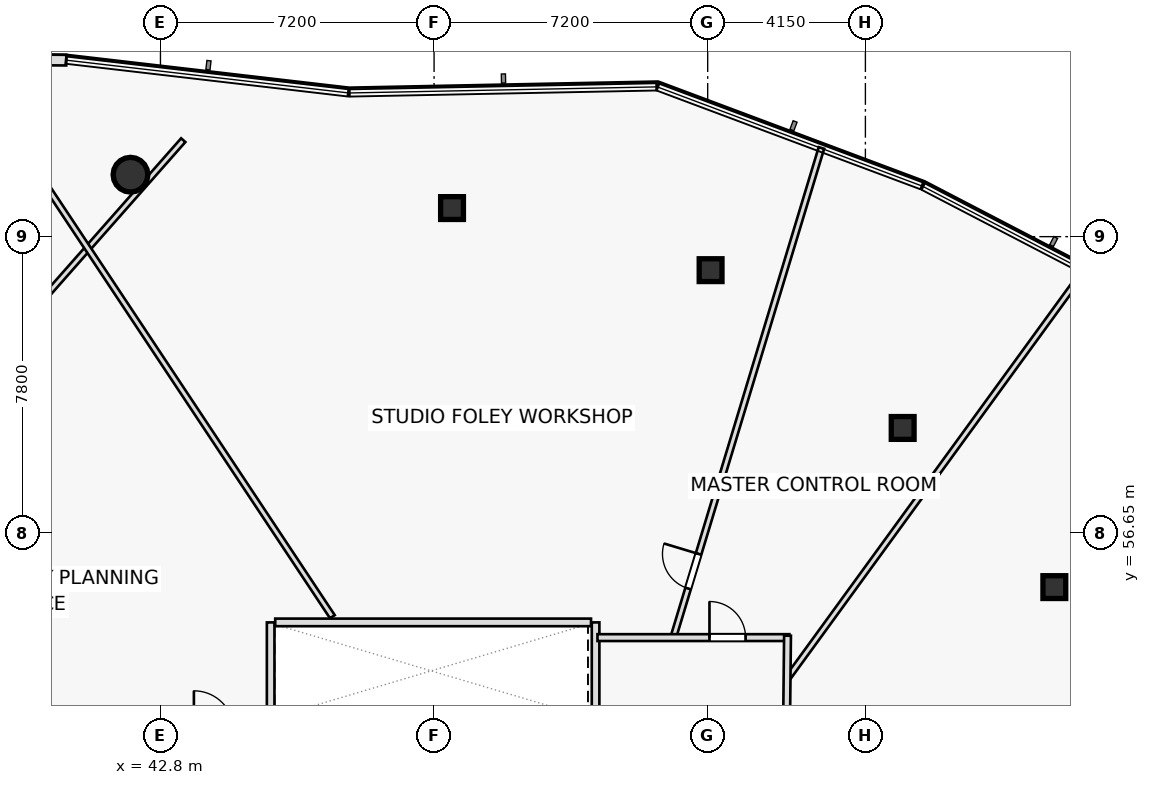
"""IFC4 building model, lengths in metres.
Left out: names, types, materials, properties, quantities, classifications, styles, units other than length and angle.
Written with IfcOpenShell. Run it as: python <this file> out.ifc"""

import sys

from ifc_helpers import new_model, si_unit, direction, frame, frame_2d, origin, origin_2d, place, context, subcontext, project, spatial, rectangle, hollow_rectangle, hollow_circle, extrude, element, fill, save


model = new_model("IFC4")
c1 = context("Model", 3, precision=1e-05, world=origin(), true_north=direction((0.0, 1.0)))
c2 = subcontext(c1, "Body", "Model", "MODEL_VIEW")
j1 = project(units=[si_unit("LENGTHUNIT", "METRE"), si_unit("PLANEANGLEUNIT", "RADIAN")], contexts=[c1])
p1 = place(None, origin())
s1 = spatial("IfcSite", under=j1, at=p1, CompositionType="ELEMENT")
p2 = place(p1, origin())
s2 = spatial("IfcBuilding", under=s1, at=p2, CompositionType="ELEMENT")
p3 = place(p2, frame((0.0, 0.0, 184.9)))
s3 = spatial("IfcBuildingStorey", under=s2, at=p3, CompositionType="ELEMENT", Elevation=184.9)
p4 = place(p3, frame((42.011, 66.08, 0.0), z_axis=(0.0, 0.0, 1.0), x_axis=(1.0, 0.0, 0.0)))
e1 = element("IfcColumn", 1, at=p4, inside=s3, PredefinedType="COLUMN", context=c2, shape_type="SweptSolid", body=[
    extrude(hollow_circle(Radius=0.457, WallThickness=0.04, at=origin_2d()), origin(), (0.0, 0.0, 1.0), 3.55),
])
for number, where, z_axis, x_axis in (
    (2, (66.322, 55.229, 0.0), (0.0, 0.0, 1.0), (1.0, 0.0, 0.0)),
    (3, (62.331, 59.416, 0.0), (0.0, 0.0, 1.0), (1.0, 0.0, 0.0)),
    (4, (57.277, 63.568, 0.0), (0.0, 0.0, 1.0), (1.0, 0.0, 0.0)),
    (5, (50.472, 65.202, 0.0), (0.0, 0.0, 1.0), (1.0, 0.0, 0.0)),
):
    element("IfcColumn", number, at=place(p3, frame(where, z_axis=z_axis, x_axis=x_axis)), inside=s3, PredefinedType="COLUMN", context=c2, shape_type="SweptSolid", body=[
        extrude(hollow_rectangle(XDim=0.6, YDim=0.6, WallThickness=0.036, at=origin_2d()), origin(), (0.0, 0.0, 1.0), 3.55),
    ])
for number, where, z_axis, x_axis in (
    (6, (45.7, 51.7, 0.0), (0.0, 0.0, 1.0), (0.0, 1.0, 0.0)),
    (7, (54.25, 51.7, 0.0), (0.0, 0.0, 1.0), (0.0, 1.0, 0.0)),
):
    element("IfcWall", number, at=place(p3, frame(where, z_axis=z_axis, x_axis=x_axis)), inside=s3, PredefinedType="PARTITIONING", context=c2, shape_type="SweptSolid", body=[
        extrude(rectangle(XDim=2.6, YDim=0.2, at=frame_2d((1.3, 0.0))), origin(), (0.0, 0.0, 1.0), 3.55),
    ])
p5 = place(p3, frame((43.4, 66.989, 0.0), z_axis=(0.0, 0.0, 1.0), x_axis=(-0.661622343701, -0.749837231881, 0.0)))
e8 = element("IfcWall", 8, at=p5, inside=s3, PredefinedType="PARTITIONING", context=c2, shape_type="SweptSolid", body=[
    extrude(rectangle(XDim=11.427, YDim=0.15, at=frame_2d((5.714, 0.0))), origin(), (0.0, 0.0, 1.0), 2.935),
])
p6 = place(p3, frame((59.289, 52.814, 0.0), z_axis=(0.0, 0.0, 1.0), x_axis=(0.588526256587, 0.808478104408, 0.0)))
e9 = element("IfcWall", 9, at=p6, inside=s3, PredefinedType="PARTITIONING", context=c2, shape_type="SweptSolid", body=[
    extrude(rectangle(XDim=13.304, YDim=0.15, at=frame_2d((6.652, 0.0))), origin(), (0.0, 0.0, 1.0), 3.025),
])
p7 = place(p3, frame((56.294, 53.9, 0.0), z_axis=(0.0, 0.0, 1.0), x_axis=(0.289678173214, 0.957124106876, 0.0)))
e10 = element("IfcWall", 10, at=p7, inside=s3, PredefinedType="PARTITIONING", context=c2, shape_type="SweptSolid", body=[
    extrude(rectangle(XDim=13.461, YDim=0.15, at=frame_2d((6.73, 0.0))), origin(), (0.0, 0.0, 1.0), 2.935),
])
p8 = place(p7, frame((1.35, 0.0, 0.0)))
e11 = element("IfcOpeningElement", 11, at=p8, cuts=e10, PredefinedType="OPENING", context=c2, shape_type="SweptSolid", body=[
    extrude(rectangle(XDim=0.95, YDim=2.05, at=frame_2d((0.475, 1.025))), frame((0.0, 0.085, 0.0), z_axis=(0.0, -1.0, 0.0), x_axis=(1.0, 0.0, 0.0)), (0.0, 0.0, 1.0), 0.17),
])
p9 = place(p3, frame((47.324, 54.45, 0.0), z_axis=(0.0, 0.0, 1.0), x_axis=(-0.553219076903, 0.833035805324, 0.0)))
e12 = element("IfcWall", 12, at=p9, inside=s3, PredefinedType="PARTITIONING", context=c2, shape_type="SweptSolid", body=[
    extrude(rectangle(XDim=17.28, YDim=0.15, at=frame_2d((8.64, 0.0))), origin(), (0.0, 0.0, 1.0), 2.935),
])
p10 = place(p3, frame((54.3, 53.9, 0.0), z_axis=(0.0, 0.0, 1.0), x_axis=(1.0, 0.0, 0.0)))
e13 = element("IfcWall", 13, at=p10, inside=s3, PredefinedType="PARTITIONING", context=c2, shape_type="SweptSolid", body=[
    extrude(rectangle(XDim=5.05, YDim=0.18, at=frame_2d((2.525, 0.0))), origin(), (0.0, 0.0, 1.0), 2.935),
])
p11 = place(p10, frame((2.947, 0.0, 0.0)))
e14 = element("IfcOpeningElement", 14, at=p11, cuts=e13, PredefinedType="OPENING", context=c2, shape_type="SweptSolid", body=[
    extrude(rectangle(XDim=0.95, YDim=2.05, at=frame_2d((0.475, 1.025))), frame((0.0, 0.1, 0.0), z_axis=(0.0, -1.0, 0.0), x_axis=(1.0, 0.0, 0.0)), (0.0, 0.0, 1.0), 0.2),
])
p12 = place(p3, frame((59.301, 53.95, 0.0), z_axis=(0.0, 0.0, 1.0), x_axis=(-0.010629422803, -0.99994350609, 0.0)))
e15 = element("IfcWall", 15, at=p12, inside=s3, PredefinedType="PARTITIONING", context=c2, shape_type="SweptSolid", body=[
    extrude(rectangle(XDim=5.65, YDim=0.18, at=frame_2d((2.825, 0.0))), origin(), (0.0, 0.0, 1.0), 2.935),
])
p13 = place(p12, frame((2.716, 0.0, 0.0)))
e16 = element("IfcOpeningElement", 16, at=p13, cuts=e15, PredefinedType="OPENING", context=c2, shape_type="SweptSolid", body=[
    extrude(rectangle(XDim=0.95, YDim=2.05, at=frame_2d((0.475, 1.025))), frame((0.0, 0.1, 0.0), z_axis=(0.0, -1.0, 0.0), x_axis=(1.0, 0.0, 0.0)), (0.0, 0.0, 1.0), 0.2),
])
p14 = place(p3, frame((40.321, 69.094, 0.0), z_axis=(0.0, 0.0, 1.0), x_axis=(-0.99996884583, 0.007893501728, 0.0)))
e17 = element("IfcWall", 17, at=p14, inside=s3, PredefinedType="STANDARD", context=c2, shape_type="SweptSolid", body=[
    extrude(rectangle(XDim=1.948, YDim=0.28, at=frame_2d((0.974, 0.0))), origin(), (0.0, 0.0, 1.0), 3.55),
])
p15 = place(p3, frame((45.82, 54.3, 0.0), z_axis=(0.0, 0.0, 1.0), x_axis=(1.0, 0.0, 0.0)))
e18 = element("IfcWall", 18, at=p15, inside=s3, PredefinedType="PARTITIONING", context=c2, shape_type="SweptSolid", body=[
    extrude(rectangle(XDim=8.31, YDim=0.2, at=frame_2d((4.155, 0.0))), origin(), (0.0, 0.0, 1.0), 3.55),
])
p16 = place(p8, origin())
e19 = element("IfcDoor", 19, at=p16, inside=s3, OperationType="SINGLE_SWING_RIGHT", PredefinedType="DOOR", context=c2, shape_type="SweptSolid", body=[
    extrude(rectangle(XDim=0.95, YDim=2.05, at=frame_2d((0.475, 1.025))), frame((0.0, 0.025, 0.0), z_axis=(0.0, -1.0, 0.0), x_axis=(1.0, 0.0, 0.0)), (0.0, 0.0, 1.0), 0.05),
])
fill(e11, e19)
p17 = place(p11, origin())
e20 = element("IfcDoor", 20, at=p17, inside=s3, OperationType="SINGLE_SWING_LEFT", PredefinedType="DOOR", context=c2, shape_type="SweptSolid", body=[
    extrude(rectangle(XDim=0.95, YDim=2.05, at=frame_2d((0.475, 1.025))), frame((0.0, 0.025, 0.0), z_axis=(0.0, -1.0, 0.0), x_axis=(1.0, 0.0, 0.0)), (0.0, 0.0, 1.0), 0.05),
])
fill(e14, e20)
save(model, sys.argv[1])
